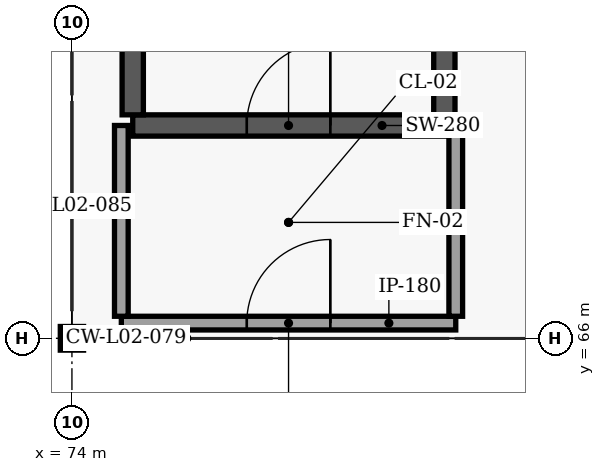
"""IFC4 building model, lengths in metres.
Left out: names, types, materials, properties, quantities, classifications, styles, units other than length and angle.
Written with IfcOpenShell. Run it as: python <this file> out.ifc"""

import sys

from ifc_helpers import new_model, si_unit, direction, frame, frame_2d, origin, origin_2d, place, context, subcontext, project, spatial, rectangle, i_section, extrude, element, fill, save


model = new_model("IFC4")
c1 = context("Model", 3, precision=1e-05, world=origin(), true_north=direction((0.0, 1.0)))
c2 = subcontext(c1, "Body", "Model", "MODEL_VIEW")
j1 = project(units=[si_unit("LENGTHUNIT", "METRE"), si_unit("PLANEANGLEUNIT", "RADIAN")], contexts=[c1])
p1 = place(None, origin())
s1 = spatial("IfcSite", under=j1, at=p1, CompositionType="ELEMENT")
p2 = place(p1, origin())
s2 = spatial("IfcBuilding", under=s1, at=p2, CompositionType="ELEMENT")
p3 = place(p2, frame((0.0, 0.0, 5.4)))
s3 = spatial("IfcBuildingStorey", under=s2, at=p3, CompositionType="ELEMENT", Elevation=5.4)
p4 = place(p3, frame((74.0, 66.0, 0.0), z_axis=(0.0, 0.0, 1.0), x_axis=(1.0, 0.0, 0.0)))
e1 = element("IfcColumn", 1, at=p4, inside=s3, PredefinedType="COLUMN", context=c2, shape_type="SweptSolid", body=[
    extrude(i_section(OverallWidth=0.306, OverallDepth=0.311, WebThickness=0.011, FlangeThickness=0.017, FilletRadius=0.015, at=origin_2d()), origin(), (0.0, 0.0, 1.0), 4.5),
])
p5 = place(p3, frame((74.8, 68.8, 0.0), z_axis=(0.0, 0.0, 1.0), x_axis=(1.0, 0.0, 0.0)))
e2 = element("IfcWall", 2, at=p5, inside=s3, PredefinedType="SHEAR", context=c2, shape_type="SweptSolid", body=[
    extrude(rectangle(XDim=4.1, YDim=0.28, at=frame_2d((2.05, 0.0))), origin(), (0.0, 0.0, 1.0), 4.5),
])
p6 = place(p5, frame((1.5, 0.0, 0.0)))
e3 = element("IfcOpeningElement", 3, at=p6, cuts=e2, PredefinedType="OPENING", context=c2, shape_type="SweptSolid", body=[
    extrude(rectangle(XDim=1.1, YDim=2.2, at=frame_2d((0.55, 1.1))), frame((0.0, 0.15, 0.0), z_axis=(0.0, -1.0, 0.0), x_axis=(1.0, 0.0, 0.0)), (0.0, 0.0, 1.0), 0.3),
])
for number, where, z_axis, x_axis in (
    (4, (74.8, 68.94, 0.0), (0.0, 0.0, 1.0), (0.0, 1.0, 0.0)),
    (5, (78.9, 68.94, 0.0), (0.0, 0.0, 1.0), (0.0, 1.0, 0.0)),
):
    element("IfcWall", number, at=place(p3, frame(where, z_axis=z_axis, x_axis=x_axis)), inside=s3, PredefinedType="SHEAR", context=c2, shape_type="SweptSolid", body=[
        extrude(rectangle(XDim=8.72, YDim=0.28, at=frame_2d((4.36, 0.0))), origin(), (0.0, 0.0, 1.0), 4.5),
    ])
p7 = place(p3, frame((74.65, 66.2, 0.0), z_axis=(0.0, 0.0, 1.0), x_axis=(1.0, 0.0, 0.0)))
e6 = element("IfcWall", 6, at=p7, inside=s3, PredefinedType="SOLIDWALL", context=c2, shape_type="SweptSolid", body=[
    extrude(rectangle(XDim=4.4, YDim=0.18, at=frame_2d((2.2, 0.0))), origin(), (0.0, 0.0, 1.0), 4.197),
])
p8 = place(p7, frame((1.65, 0.0, 0.0)))
e7 = element("IfcOpeningElement", 7, at=p8, cuts=e6, PredefinedType="OPENING", context=c2, shape_type="SweptSolid", body=[
    extrude(rectangle(XDim=1.1, YDim=2.2, at=frame_2d((0.55, 1.1))), frame((0.0, 0.1, 0.0), z_axis=(0.0, -1.0, 0.0), x_axis=(1.0, 0.0, 0.0)), (0.0, 0.0, 1.0), 0.2),
])
for number, where, z_axis, x_axis in (
    (8, (74.65, 66.29, 0.0), (0.0, 0.0, 1.0), (0.0, 1.0, 0.0)),
    (9, (79.05, 66.29, 0.0), (0.0, 0.0, 1.0), (0.0, 1.0, 0.0)),
):
    element("IfcWall", number, at=place(p3, frame(where, z_axis=z_axis, x_axis=x_axis)), inside=s3, PredefinedType="SOLIDWALL", context=c2, shape_type="SweptSolid", body=[
        extrude(rectangle(XDim=2.51, YDim=0.18, at=frame_2d((1.255, 0.0))), origin(), (0.0, 0.0, 1.0), 4.5),
    ])
p9 = place(p6, origin())
e10 = element("IfcDoor", 10, at=p9, inside=s3, OperationType="SINGLE_SWING_RIGHT", PredefinedType="DOOR", context=c2, shape_type="SweptSolid", body=[
    extrude(rectangle(XDim=1.1, YDim=2.2, at=frame_2d((0.55, 1.1))), frame((0.0, 0.025, 0.0), z_axis=(0.0, -1.0, 0.0), x_axis=(1.0, 0.0, 0.0)), (0.0, 0.0, 1.0), 0.05),
])
fill(e3, e10)
p10 = place(p8, origin())
e11 = element("IfcDoor", 11, at=p10, inside=s3, OperationType="SINGLE_SWING_RIGHT", PredefinedType="DOOR", context=c2, shape_type="SweptSolid", body=[
    extrude(rectangle(XDim=1.1, YDim=2.2, at=frame_2d((0.55, 1.1))), frame((0.0, 0.025, 0.0), z_axis=(0.0, -1.0, 0.0), x_axis=(1.0, 0.0, 0.0)), (0.0, 0.0, 1.0), 0.05),
])
fill(e7, e11)
save(model, sys.argv[1])
